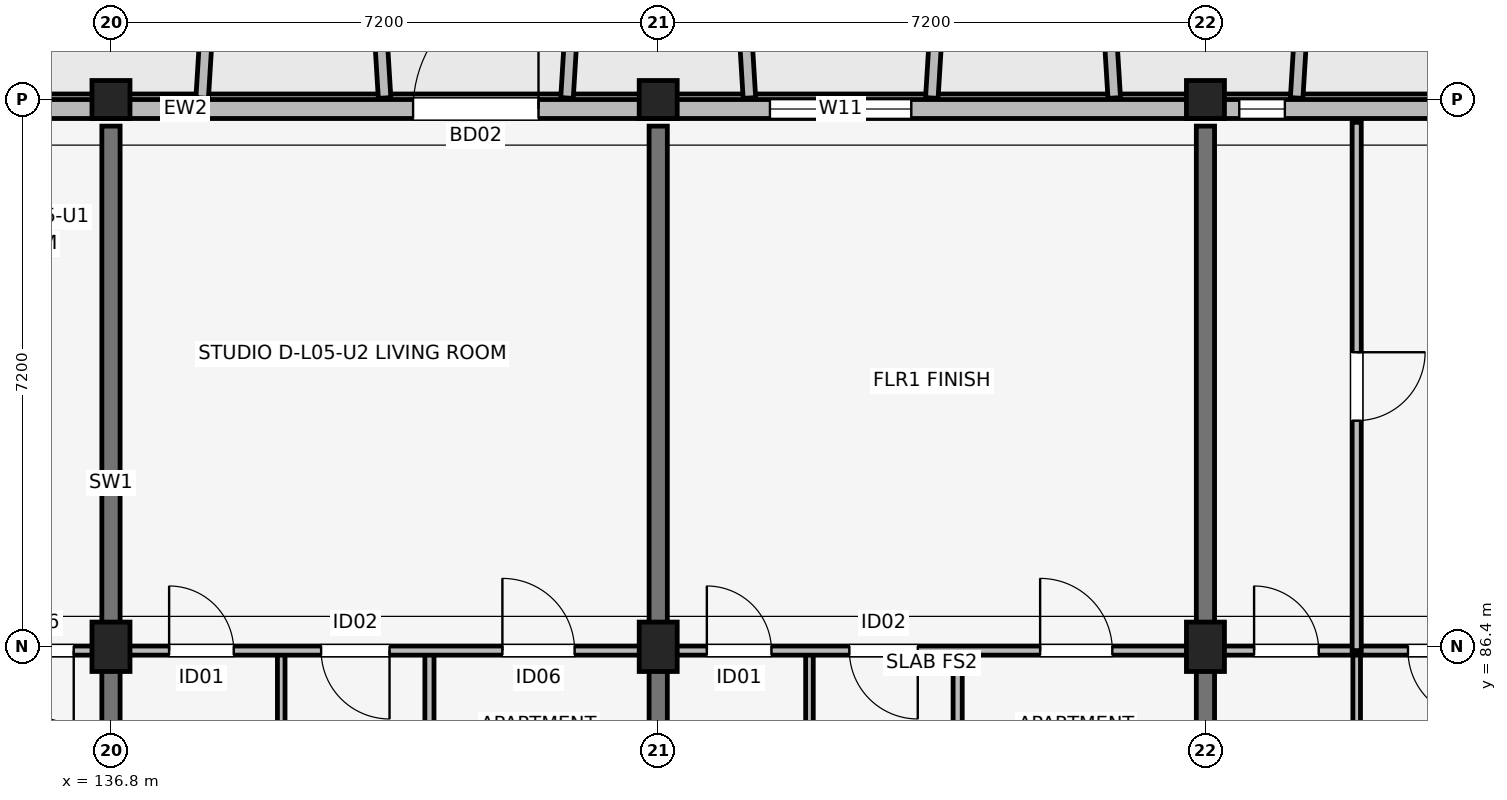
"""IFC4 building model, lengths in metres.
Left out: names, types, materials, properties, quantities, classifications, styles, units other than length and angle.
Written with IfcOpenShell. Run it as: python <this file> out.ifc"""

import sys

from ifc_helpers import new_model, si_unit, direction, frame, frame_2d, origin, origin_2d, place, context, subcontext, project, spatial, rectangle, extrude, element, fill, save


model = new_model("IFC4")
c1 = context("Model", 3, precision=1e-05, world=origin(), true_north=direction((0.0, 1.0)))
c2 = subcontext(c1, "Body", "Model", "MODEL_VIEW")
j1 = project(units=[si_unit("LENGTHUNIT", "METRE"), si_unit("PLANEANGLEUNIT", "RADIAN")], contexts=[c1])
p1 = place(None, origin())
s1 = spatial("IfcSite", under=j1, at=p1, CompositionType="ELEMENT")
p2 = place(p1, origin())
s2 = spatial("IfcBuilding", under=s1, at=p2, CompositionType="ELEMENT")
p3 = place(p2, frame((0.0, 0.0, 18.15)))
s3 = spatial("IfcBuildingStorey", under=s2, at=p3, CompositionType="ELEMENT", Elevation=18.15)
p4 = place(p3, frame((136.8, 86.4, 0.0), z_axis=(0.0, 0.0, 1.0), x_axis=(1.0, 0.0, 0.0)))
e1 = element("IfcColumn", 1, at=p4, inside=s3, PredefinedType="COLUMN", context=c2, shape_type="SweptSolid", body=[
    extrude(rectangle(XDim=0.5, YDim=0.65, at=origin_2d()), origin(), (0.0, 0.0, 1.0), 3.15),
])
p5 = place(p3, frame((136.8, 93.6, 0.0), z_axis=(0.0, 0.0, 1.0), x_axis=(1.0, 0.0, 0.0)))
e2 = element("IfcColumn", 2, at=p5, inside=s3, PredefinedType="COLUMN", context=c2, shape_type="SweptSolid", body=[
    extrude(rectangle(XDim=0.5, YDim=0.5, at=origin_2d()), origin(), (0.0, 0.0, 1.0), 3.15),
])
p6 = place(p3, frame((144.0, 86.4, 0.0), z_axis=(0.0, 0.0, 1.0), x_axis=(1.0, 0.0, 0.0)))
e3 = element("IfcColumn", 3, at=p6, inside=s3, PredefinedType="COLUMN", context=c2, shape_type="SweptSolid", body=[
    extrude(rectangle(XDim=0.5, YDim=0.65, at=origin_2d()), origin(), (0.0, 0.0, 1.0), 3.15),
])
p7 = place(p3, frame((144.0, 93.6, 0.0), z_axis=(0.0, 0.0, 1.0), x_axis=(1.0, 0.0, 0.0)))
e4 = element("IfcColumn", 4, at=p7, inside=s3, PredefinedType="COLUMN", context=c2, shape_type="SweptSolid", body=[
    extrude(rectangle(XDim=0.5, YDim=0.5, at=origin_2d()), origin(), (0.0, 0.0, 1.0), 3.15),
])
p8 = place(p3, frame((151.2, 86.4, 0.0), z_axis=(0.0, 0.0, 1.0), x_axis=(1.0, 0.0, 0.0)))
e5 = element("IfcColumn", 5, at=p8, inside=s3, PredefinedType="COLUMN", context=c2, shape_type="SweptSolid", body=[
    extrude(rectangle(XDim=0.5, YDim=0.65, at=origin_2d()), origin(), (0.0, 0.0, 1.0), 3.15),
])
p9 = place(p3, frame((151.2, 93.6, 0.0), z_axis=(0.0, 0.0, 1.0), x_axis=(1.0, 0.0, 0.0)))
e6 = element("IfcColumn", 6, at=p9, inside=s3, PredefinedType="COLUMN", context=c2, shape_type="SweptSolid", body=[
    extrude(rectangle(XDim=0.5, YDim=0.5, at=origin_2d()), origin(), (0.0, 0.0, 1.0), 3.15),
])
for number, where, z_axis, x_axis in (
    (7, (136.8, 83.85, 0.0), (0.0, 0.0, 1.0), (0.0, 1.0, 0.0)),
    (8, (144.0, 83.85, 0.0), (0.0, 0.0, 1.0), (0.0, 1.0, 0.0)),
    (9, (151.2, 83.85, 0.0), (0.0, 0.0, 1.0), (0.0, 1.0, 0.0)),
):
    element("IfcWall", number, at=place(p3, frame(where, z_axis=z_axis, x_axis=x_axis)), inside=s3, PredefinedType="SHEAR", context=c2, shape_type="SweptSolid", body=[
        extrude(rectangle(XDim=9.4, YDim=0.24, at=frame_2d((4.7, 0.0))), origin(), (0.0, 0.0, 1.0), 3.15),
    ])
p10 = place(p3, frame((162.8, 93.475, 0.0), z_axis=(0.0, 0.0, 1.0), x_axis=(-1.0, 0.0, 0.0)))
e10 = element("IfcWall", 10, at=p10, inside=s3, PredefinedType="SOLIDWALL", context=c2, shape_type="SweptSolid", body=[
    extrude(rectangle(XDim=30.4, YDim=0.25, at=frame_2d((15.2, 0.0))), origin(), (0.0, 0.0, 1.0), 2.43),
])
p11 = place(p10, frame((22.025, 0.0, 0.0), z_axis=(0.0, 0.0, 1.0), x_axis=(-1.0, 0.0, 0.0)))
e11 = element("IfcOpeningElement", 11, at=p11, cuts=e10, PredefinedType="OPENING", context=c2, shape_type="SweptSolid", body=[
    extrude(rectangle(XDim=1.65, YDim=2.15, at=frame_2d((0.825, 1.075))), frame((0.0, 0.135, 0.0), z_axis=(0.0, -1.0, 0.0), x_axis=(1.0, 0.0, 0.0)), (0.0, 0.0, 1.0), 0.27),
])
p12 = place(p10, frame((7.55, 0.0, 0.0), z_axis=(0.0, 0.0, 1.0), x_axis=(-1.0, 0.0, 0.0)))
e12 = element("IfcOpeningElement", 12, at=p12, cuts=e10, PredefinedType="OPENING", context=c2, shape_type="SweptSolid", body=[
    extrude(rectangle(XDim=1.5, YDim=2.15, at=frame_2d((0.75, 1.075))), frame((0.0, 0.135, 0.0), z_axis=(0.0, -1.0, 0.0), x_axis=(1.0, 0.0, 0.0)), (0.0, 0.0, 1.0), 0.27),
])
p13 = place(p10, frame((28.015, 0.0, 0.75)))
e13 = element("IfcOpeningElement", 13, at=p13, cuts=e10, PredefinedType="OPENING", context=c2, shape_type="SweptSolid", body=[
    extrude(rectangle(XDim=0.6, YDim=1.25, at=frame_2d((0.3, 0.625))), frame((0.0, 0.135, 0.0), z_axis=(0.0, -1.0, 0.0), x_axis=(1.0, 0.0, 0.0)), (0.0, 0.0, 1.0), 0.27),
])
p14 = place(p10, frame((15.47, 0.0, 0.7)))
e14 = element("IfcOpeningElement", 14, at=p14, cuts=e10, PredefinedType="OPENING", context=c2, shape_type="SweptSolid", body=[
    extrude(rectangle(XDim=1.86, YDim=1.6, at=frame_2d((0.93, 0.8))), frame((0.0, 0.135, 0.0), z_axis=(0.0, -1.0, 0.0), x_axis=(1.0, 0.0, 0.0)), (0.0, 0.0, 1.0), 0.27),
])
p15 = place(p10, frame((10.555, 0.0, 0.75)))
e15 = element("IfcOpeningElement", 15, at=p15, cuts=e10, PredefinedType="OPENING", context=c2, shape_type="SweptSolid", body=[
    extrude(rectangle(XDim=0.6, YDim=1.25, at=frame_2d((0.3, 0.625))), frame((0.0, 0.135, 0.0), z_axis=(0.0, -1.0, 0.0), x_axis=(1.0, 0.0, 0.0)), (0.0, 0.0, 1.0), 0.27),
])
p16 = place(p10, frame((3.355, 0.0, 0.75)))
e16 = element("IfcOpeningElement", 16, at=p16, cuts=e10, PredefinedType="OPENING", context=c2, shape_type="SweptSolid", body=[
    extrude(rectangle(XDim=0.6, YDim=1.25, at=frame_2d((0.3, 0.625))), frame((0.0, 0.135, 0.0), z_axis=(0.0, -1.0, 0.0), x_axis=(1.0, 0.0, 0.0)), (0.0, 0.0, 1.0), 0.27),
])
p17 = place(p10, frame((1.05, 0.0, 0.75)))
e17 = element("IfcOpeningElement", 17, at=p17, cuts=e10, PredefinedType="OPENING", context=c2, shape_type="SweptSolid", body=[
    extrude(rectangle(XDim=1.1, YDim=1.5, at=frame_2d((0.55, 0.75))), frame((0.0, 0.135, 0.0), z_axis=(0.0, -1.0, 0.0), x_axis=(1.0, 0.0, 0.0)), (0.0, 0.0, 1.0), 0.27),
])
for number, where, z_axis, x_axis in (
    (18, (138.0, 93.62, 0.0), (0.0, 0.0, 1.0), (0.061, 0.998, 0.0)),
    (19, (140.4, 93.62, 0.0), (0.0, 0.0, 1.0), (-0.061, 0.998, 0.0)),
    (20, (142.8, 93.62, 0.0), (0.0, 0.0, 1.0), (0.061, 0.998, 0.0)),
):
    element("IfcWall", number, at=place(p3, frame(where, z_axis=z_axis, x_axis=x_axis)), inside=s3, PredefinedType="ELEMENTEDWALL", context=c2, shape_type="SweptSolid", body=[
        extrude(rectangle(XDim=1.964, YDim=0.165, at=frame_2d((0.982, 0.0))), origin(), (0.0, 0.0, 1.0), 2.55),
    ])
for number, where, z_axis, x_axis in (
    (21, (145.2, 93.62, 0.0), (0.0, 0.0, 1.0), (-0.061, 0.998, 0.0)),
    (22, (147.6, 93.62, 0.0), (0.0, 0.0, 1.0), (0.061, 0.998, 0.0)),
    (23, (150.0, 93.62, 0.0), (0.0, 0.0, 1.0), (-0.061, 0.998, 0.0)),
):
    element("IfcWall", number, at=place(p3, frame(where, z_axis=z_axis, x_axis=x_axis)), inside=s3, PredefinedType="ELEMENTEDWALL", context=c2, shape_type="SweptSolid", body=[
        extrude(rectangle(XDim=1.964, YDim=0.165, at=frame_2d((0.982, 0.0))), origin(), (0.0, 0.0, 1.0), 2.45),
    ])
p18 = place(p3, frame((152.4, 93.62, 0.0), z_axis=(0.0, 0.0, 1.0), x_axis=(0.061170732449, 0.998127317276, 0.0)))
e24 = element("IfcWall", 24, at=p18, inside=s3, PredefinedType="ELEMENTEDWALL", context=c2, shape_type="SweptSolid", body=[
    extrude(rectangle(XDim=1.964, YDim=0.165, at=frame_2d((0.982, 0.0))), origin(), (0.0, 0.0, 1.0), 2.53),
])
p19 = place(p3, frame((129.74, 86.35, 0.0), z_axis=(0.0, 0.0, 1.0), x_axis=(1.0, 0.0, 0.0)))
e25 = element("IfcWall", 25, at=p19, inside=s3, PredefinedType="PARTITIONING", context=c2, shape_type="SweptSolid", body=[
    extrude(rectangle(XDim=6.92, YDim=0.12, at=frame_2d((3.46, 0.0))), origin(), (0.0, 0.0, 1.0), 2.375),
])
p20 = place(p19, frame((3.09, 0.0, 0.0), z_axis=(0.0, 0.0, 1.0), x_axis=(-1.0, 0.0, 0.0)))
e26 = element("IfcOpeningElement", 26, at=p20, cuts=e25, PredefinedType="OPENING", context=c2, shape_type="SweptSolid", body=[
    extrude(rectangle(XDim=0.85, YDim=2.08, at=frame_2d((0.425, 1.04))), frame((0.0, 0.07, 0.0), z_axis=(0.0, -1.0, 0.0), x_axis=(1.0, 0.0, 0.0)), (0.0, 0.0, 1.0), 0.14),
])
p21 = place(p19, frame((3.995, 0.0, 0.0)))
e27 = element("IfcOpeningElement", 27, at=p21, cuts=e25, PredefinedType="OPENING", context=c2, shape_type="SweptSolid", body=[
    extrude(rectangle(XDim=0.9, YDim=2.08, at=frame_2d((0.45, 1.04))), frame((0.0, 0.07, 0.0), z_axis=(0.0, -1.0, 0.0), x_axis=(1.0, 0.0, 0.0)), (0.0, 0.0, 1.0), 0.14),
])
p22 = place(p19, frame((6.57, 0.0, 0.0), z_axis=(0.0, 0.0, 1.0), x_axis=(-1.0, 0.0, 0.0)))
e28 = element("IfcOpeningElement", 28, at=p22, cuts=e25, PredefinedType="OPENING", context=c2, shape_type="SweptSolid", body=[
    extrude(rectangle(XDim=0.95, YDim=2.08, at=frame_2d((0.475, 1.04))), frame((0.0, 0.07, 0.0), z_axis=(0.0, -1.0, 0.0), x_axis=(1.0, 0.0, 0.0)), (0.0, 0.0, 1.0), 0.14),
])
p23 = place(p3, frame((139.04, 83.7, 0.0), z_axis=(0.0, 0.0, 1.0), x_axis=(0.0, 1.0, 0.0)))
e29 = element("IfcWall", 29, at=p23, inside=s3, PredefinedType="PARTITIONING", context=c2, shape_type="SweptSolid", body=[
    extrude(rectangle(XDim=2.65, YDim=0.1, at=frame_2d((1.325, 0.0))), origin(), (0.0, 0.0, 1.0), 2.375),
])
p24 = place(p3, frame((140.99, 83.7, 0.0), z_axis=(0.0, 0.0, 1.0), x_axis=(0.0, 1.0, 0.0)))
e30 = element("IfcWall", 30, at=p24, inside=s3, PredefinedType="PARTITIONING", context=c2, shape_type="SweptSolid", body=[
    extrude(rectangle(XDim=2.65, YDim=0.12, at=frame_2d((1.325, 0.0))), origin(), (0.0, 0.0, 1.0), 2.375),
])
p25 = place(p3, frame((136.94, 86.35, 0.0), z_axis=(0.0, 0.0, 1.0), x_axis=(1.0, 0.0, 0.0)))
e31 = element("IfcWall", 31, at=p25, inside=s3, PredefinedType="PARTITIONING", context=c2, shape_type="SweptSolid", body=[
    extrude(rectangle(XDim=6.92, YDim=0.12, at=frame_2d((3.46, 0.0))), origin(), (0.0, 0.0, 1.0), 2.375),
])
p26 = place(p25, frame((0.625, 0.0, 0.0)))
e32 = element("IfcOpeningElement", 32, at=p26, cuts=e31, PredefinedType="OPENING", context=c2, shape_type="SweptSolid", body=[
    extrude(rectangle(XDim=0.85, YDim=2.08, at=frame_2d((0.425, 1.04))), frame((0.0, 0.07, 0.0), z_axis=(0.0, -1.0, 0.0), x_axis=(1.0, 0.0, 0.0)), (0.0, 0.0, 1.0), 0.14),
])
p27 = place(p25, frame((3.525, 0.0, 0.0), z_axis=(0.0, 0.0, 1.0), x_axis=(-1.0, 0.0, 0.0)))
e33 = element("IfcOpeningElement", 33, at=p27, cuts=e31, PredefinedType="OPENING", context=c2, shape_type="SweptSolid", body=[
    extrude(rectangle(XDim=0.9, YDim=2.08, at=frame_2d((0.45, 1.04))), frame((0.0, 0.07, 0.0), z_axis=(0.0, -1.0, 0.0), x_axis=(1.0, 0.0, 0.0)), (0.0, 0.0, 1.0), 0.14),
])
p28 = place(p25, frame((5.01, 0.0, 0.0)))
e34 = element("IfcOpeningElement", 34, at=p28, cuts=e31, PredefinedType="OPENING", context=c2, shape_type="SweptSolid", body=[
    extrude(rectangle(XDim=0.95, YDim=2.08, at=frame_2d((0.475, 1.04))), frame((0.0, 0.07, 0.0), z_axis=(0.0, -1.0, 0.0), x_axis=(1.0, 0.0, 0.0)), (0.0, 0.0, 1.0), 0.14),
])
p29 = place(p3, frame((145.99, 83.7, 0.0), z_axis=(0.0, 0.0, 1.0), x_axis=(0.0, 1.0, 0.0)))
e35 = element("IfcWall", 35, at=p29, inside=s3, PredefinedType="PARTITIONING", context=c2, shape_type="SweptSolid", body=[
    extrude(rectangle(XDim=2.65, YDim=0.1, at=frame_2d((1.325, 0.0))), origin(), (0.0, 0.0, 1.0), 2.375),
])
p30 = place(p3, frame((147.94, 83.7, 0.0), z_axis=(0.0, 0.0, 1.0), x_axis=(0.0, 1.0, 0.0)))
e36 = element("IfcWall", 36, at=p30, inside=s3, PredefinedType="PARTITIONING", context=c2, shape_type="SweptSolid", body=[
    extrude(rectangle(XDim=2.65, YDim=0.12, at=frame_2d((1.325, 0.0))), origin(), (0.0, 0.0, 1.0), 2.375),
])
p31 = place(p3, frame((144.14, 86.35, 0.0), z_axis=(0.0, 0.0, 1.0), x_axis=(1.0, 0.0, 0.0)))
e37 = element("IfcWall", 37, at=p31, inside=s3, PredefinedType="PARTITIONING", context=c2, shape_type="SweptSolid", body=[
    extrude(rectangle(XDim=6.92, YDim=0.12, at=frame_2d((3.46, 0.0))), origin(), (0.0, 0.0, 1.0), 2.375),
])
p32 = place(p31, frame((0.5, 0.0, 0.0)))
e38 = element("IfcOpeningElement", 38, at=p32, cuts=e37, PredefinedType="OPENING", context=c2, shape_type="SweptSolid", body=[
    extrude(rectangle(XDim=0.85, YDim=2.08, at=frame_2d((0.425, 1.04))), frame((0.0, 0.07, 0.0), z_axis=(0.0, -1.0, 0.0), x_axis=(1.0, 0.0, 0.0)), (0.0, 0.0, 1.0), 0.14),
])
p33 = place(p31, frame((3.275, 0.0, 0.0), z_axis=(0.0, 0.0, 1.0), x_axis=(-1.0, 0.0, 0.0)))
e39 = element("IfcOpeningElement", 39, at=p33, cuts=e37, PredefinedType="OPENING", context=c2, shape_type="SweptSolid", body=[
    extrude(rectangle(XDim=0.9, YDim=2.08, at=frame_2d((0.45, 1.04))), frame((0.0, 0.07, 0.0), z_axis=(0.0, -1.0, 0.0), x_axis=(1.0, 0.0, 0.0)), (0.0, 0.0, 1.0), 0.14),
])
p34 = place(p31, frame((4.885, 0.0, 0.0)))
e40 = element("IfcOpeningElement", 40, at=p34, cuts=e37, PredefinedType="OPENING", context=c2, shape_type="SweptSolid", body=[
    extrude(rectangle(XDim=0.95, YDim=2.08, at=frame_2d((0.475, 1.04))), frame((0.0, 0.07, 0.0), z_axis=(0.0, -1.0, 0.0), x_axis=(1.0, 0.0, 0.0)), (0.0, 0.0, 1.0), 0.14),
])
p35 = place(p3, frame((153.19, 83.7, 0.0), z_axis=(0.0, 0.0, 1.0), x_axis=(0.0, 1.0, 0.0)))
e41 = element("IfcWall", 41, at=p35, inside=s3, PredefinedType="PARTITIONING", context=c2, shape_type="SweptSolid", body=[
    extrude(rectangle(XDim=2.65, YDim=0.1, at=frame_2d((1.325, 0.0))), origin(), (0.0, 0.0, 1.0), 2.375),
])
p36 = place(p3, frame((151.34, 86.35, 0.0), z_axis=(0.0, 0.0, 1.0), x_axis=(1.0, 0.0, 0.0)))
e42 = element("IfcWall", 42, at=p36, inside=s3, PredefinedType="PARTITIONING", context=c2, shape_type="SweptSolid", body=[
    extrude(rectangle(XDim=6.92, YDim=0.12, at=frame_2d((3.46, 0.0))), origin(), (0.0, 0.0, 1.0), 2.375),
])
p37 = place(p36, frame((0.5, 0.0, 0.0)))
e43 = element("IfcOpeningElement", 43, at=p37, cuts=e42, PredefinedType="OPENING", context=c2, shape_type="SweptSolid", body=[
    extrude(rectangle(XDim=0.85, YDim=2.08, at=frame_2d((0.425, 1.04))), frame((0.0, 0.07, 0.0), z_axis=(0.0, -1.0, 0.0), x_axis=(1.0, 0.0, 0.0)), (0.0, 0.0, 1.0), 0.14),
])
p38 = place(p36, frame((3.425, 0.0, 0.0), z_axis=(0.0, 0.0, 1.0), x_axis=(-1.0, 0.0, 0.0)))
e44 = element("IfcOpeningElement", 44, at=p38, cuts=e42, PredefinedType="OPENING", context=c2, shape_type="SweptSolid", body=[
    extrude(rectangle(XDim=0.9, YDim=2.08, at=frame_2d((0.45, 1.04))), frame((0.0, 0.07, 0.0), z_axis=(0.0, -1.0, 0.0), x_axis=(1.0, 0.0, 0.0)), (0.0, 0.0, 1.0), 0.14),
])
p39 = place(p36, frame((5.035, 0.0, 0.0)))
e45 = element("IfcOpeningElement", 45, at=p39, cuts=e42, PredefinedType="OPENING", context=c2, shape_type="SweptSolid", body=[
    extrude(rectangle(XDim=0.95, YDim=2.08, at=frame_2d((0.475, 1.04))), frame((0.0, 0.07, 0.0), z_axis=(0.0, -1.0, 0.0), x_axis=(1.0, 0.0, 0.0)), (0.0, 0.0, 1.0), 0.14),
])
p40 = place(p3, frame((153.19, 86.35, 0.0), z_axis=(0.0, 0.0, 1.0), x_axis=(0.0, 1.0, 0.0)))
e46 = element("IfcWall", 46, at=p40, inside=s3, PredefinedType="PARTITIONING", context=c2, shape_type="SweptSolid", body=[
    extrude(rectangle(XDim=6.95, YDim=0.12, at=frame_2d((3.475, 0.0))), origin(), (0.0, 0.0, 1.0), 2.375),
])
p41 = place(p40, frame((3.925, 0.0, 0.0), z_axis=(0.0, 0.0, 1.0), x_axis=(-1.0, 0.0, 0.0)))
e47 = element("IfcOpeningElement", 47, at=p41, cuts=e46, PredefinedType="OPENING", context=c2, shape_type="SweptSolid", body=[
    extrude(rectangle(XDim=0.9, YDim=2.08, at=frame_2d((0.45, 1.04))), frame((0.0, 0.07, 0.0), z_axis=(0.0, -1.0, 0.0), x_axis=(1.0, 0.0, 0.0)), (0.0, 0.0, 1.0), 0.14),
])
p42 = place(p11, origin())
e48 = element("IfcDoor", 48, at=p42, inside=s3, OperationType="SINGLE_SWING_LEFT", PredefinedType="DOOR", context=c2, shape_type="SweptSolid", body=[
    extrude(rectangle(XDim=1.65, YDim=2.15, at=frame_2d((0.825, 1.075))), frame((0.0, 0.025, 0.0), z_axis=(0.0, -1.0, 0.0), x_axis=(1.0, 0.0, 0.0)), (0.0, 0.0, 1.0), 0.05),
])
fill(e11, e48)
p43 = place(p14, origin())
e49 = element("IfcWindow", 49, at=p43, inside=s3, PartitioningType="SINGLE_PANEL", PredefinedType="WINDOW", context=c2, shape_type="SweptSolid", body=[
    extrude(rectangle(XDim=1.86, YDim=1.6, at=frame_2d((0.93, 0.8))), frame((0.0, 0.03, 0.0), z_axis=(0.0, -1.0, 0.0), x_axis=(1.0, 0.0, 0.0)), (0.0, 0.0, 1.0), 0.06),
])
fill(e14, e49)
p44 = place(p15, origin())
e50 = element("IfcWindow", 50, at=p44, inside=s3, PartitioningType="SINGLE_PANEL", PredefinedType="WINDOW", context=c2, shape_type="SweptSolid", body=[
    extrude(rectangle(XDim=0.6, YDim=1.25, at=frame_2d((0.3, 0.625))), frame((0.0, 0.03, 0.0), z_axis=(0.0, -1.0, 0.0), x_axis=(1.0, 0.0, 0.0)), (0.0, 0.0, 1.0), 0.06),
])
fill(e15, e50)
p45 = place(p22, origin())
e51 = element("IfcDoor", 51, at=p45, inside=s3, OperationType="SINGLE_SWING_RIGHT", PredefinedType="DOOR", context=c2, shape_type="SweptSolid", body=[
    extrude(rectangle(XDim=0.95, YDim=2.08, at=frame_2d((0.475, 1.04))), frame((0.0, 0.025, 0.0), z_axis=(0.0, -1.0, 0.0), x_axis=(1.0, 0.0, 0.0)), (0.0, 0.0, 1.0), 0.05),
])
fill(e28, e51)
p46 = place(p26, origin())
e52 = element("IfcDoor", 52, at=p46, inside=s3, OperationType="SINGLE_SWING_LEFT", PredefinedType="DOOR", context=c2, shape_type="SweptSolid", body=[
    extrude(rectangle(XDim=0.85, YDim=2.08, at=frame_2d((0.425, 1.04))), frame((0.0, 0.025, 0.0), z_axis=(0.0, -1.0, 0.0), x_axis=(1.0, 0.0, 0.0)), (0.0, 0.0, 1.0), 0.05),
])
fill(e32, e52)
p47 = place(p27, origin())
e53 = element("IfcDoor", 53, at=p47, inside=s3, OperationType="SINGLE_SWING_RIGHT", PredefinedType="DOOR", context=c2, shape_type="SweptSolid", body=[
    extrude(rectangle(XDim=0.9, YDim=2.08, at=frame_2d((0.45, 1.04))), frame((0.0, 0.025, 0.0), z_axis=(0.0, -1.0, 0.0), x_axis=(1.0, 0.0, 0.0)), (0.0, 0.0, 1.0), 0.05),
])
fill(e33, e53)
p48 = place(p28, origin())
e54 = element("IfcDoor", 54, at=p48, inside=s3, OperationType="SINGLE_SWING_LEFT", PredefinedType="DOOR", context=c2, shape_type="SweptSolid", body=[
    extrude(rectangle(XDim=0.95, YDim=2.08, at=frame_2d((0.475, 1.04))), frame((0.0, 0.025, 0.0), z_axis=(0.0, -1.0, 0.0), x_axis=(1.0, 0.0, 0.0)), (0.0, 0.0, 1.0), 0.05),
])
fill(e34, e54)
p49 = place(p32, origin())
e55 = element("IfcDoor", 55, at=p49, inside=s3, OperationType="SINGLE_SWING_LEFT", PredefinedType="DOOR", context=c2, shape_type="SweptSolid", body=[
    extrude(rectangle(XDim=0.85, YDim=2.08, at=frame_2d((0.425, 1.04))), frame((0.0, 0.025, 0.0), z_axis=(0.0, -1.0, 0.0), x_axis=(1.0, 0.0, 0.0)), (0.0, 0.0, 1.0), 0.05),
])
fill(e38, e55)
p50 = place(p33, origin())
e56 = element("IfcDoor", 56, at=p50, inside=s3, OperationType="SINGLE_SWING_RIGHT", PredefinedType="DOOR", context=c2, shape_type="SweptSolid", body=[
    extrude(rectangle(XDim=0.9, YDim=2.08, at=frame_2d((0.45, 1.04))), frame((0.0, 0.025, 0.0), z_axis=(0.0, -1.0, 0.0), x_axis=(1.0, 0.0, 0.0)), (0.0, 0.0, 1.0), 0.05),
])
fill(e39, e56)
p51 = place(p34, origin())
e57 = element("IfcDoor", 57, at=p51, inside=s3, OperationType="SINGLE_SWING_LEFT", PredefinedType="DOOR", context=c2, shape_type="SweptSolid", body=[
    extrude(rectangle(XDim=0.95, YDim=2.08, at=frame_2d((0.475, 1.04))), frame((0.0, 0.025, 0.0), z_axis=(0.0, -1.0, 0.0), x_axis=(1.0, 0.0, 0.0)), (0.0, 0.0, 1.0), 0.05),
])
fill(e40, e57)
p52 = place(p37, origin())
e58 = element("IfcDoor", 58, at=p52, inside=s3, OperationType="SINGLE_SWING_LEFT", PredefinedType="DOOR", context=c2, shape_type="SweptSolid", body=[
    extrude(rectangle(XDim=0.85, YDim=2.08, at=frame_2d((0.425, 1.04))), frame((0.0, 0.025, 0.0), z_axis=(0.0, -1.0, 0.0), x_axis=(1.0, 0.0, 0.0)), (0.0, 0.0, 1.0), 0.05),
])
fill(e43, e58)
p53 = place(p38, origin())
e59 = element("IfcDoor", 59, at=p53, inside=s3, OperationType="SINGLE_SWING_RIGHT", PredefinedType="DOOR", context=c2, shape_type="SweptSolid", body=[
    extrude(rectangle(XDim=0.9, YDim=2.08, at=frame_2d((0.45, 1.04))), frame((0.0, 0.025, 0.0), z_axis=(0.0, -1.0, 0.0), x_axis=(1.0, 0.0, 0.0)), (0.0, 0.0, 1.0), 0.05),
])
fill(e44, e59)
p54 = place(p41, origin())
e60 = element("IfcDoor", 60, at=p54, inside=s3, OperationType="SINGLE_SWING_RIGHT", PredefinedType="DOOR", context=c2, shape_type="SweptSolid", body=[
    extrude(rectangle(XDim=0.9, YDim=2.08, at=frame_2d((0.45, 1.04))), frame((0.0, 0.025, 0.0), z_axis=(0.0, -1.0, 0.0), x_axis=(1.0, 0.0, 0.0)), (0.0, 0.0, 1.0), 0.05),
])
fill(e47, e60)
save(model, sys.argv[1])
